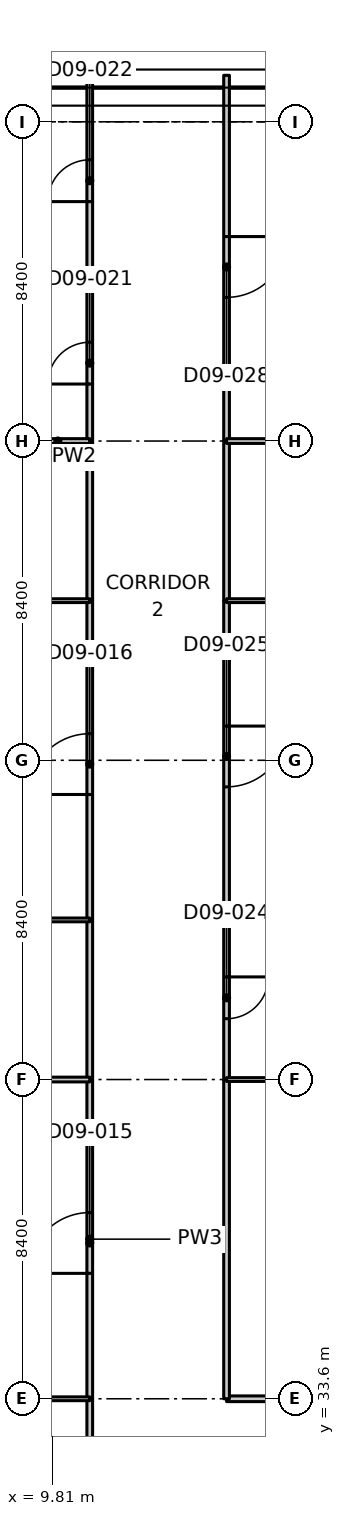
"""IFC4 building model, lengths in metres.
Left out: names, types, materials, properties, quantities, classifications, styles, units other than length and angle.
Written with IfcOpenShell. Run it as: python <this file> out.ifc"""

import sys

from ifc_helpers import new_model, si_unit, direction, frame, frame_2d, origin, place, context, subcontext, project, spatial, polyline, rectangle, outline, extrude, element, fill, save


model = new_model("IFC4")
c1 = context("Model", 3, precision=1e-05, world=origin(), true_north=direction((0.0, 1.0)))
c2 = subcontext(c1, "Body", "Model", "MODEL_VIEW")
j1 = project(units=[si_unit("LENGTHUNIT", "METRE"), si_unit("PLANEANGLEUNIT", "RADIAN")], contexts=[c1])
p1 = place(None, origin())
s1 = spatial("IfcSite", under=j1, at=p1, CompositionType="ELEMENT")
p2 = place(p1, origin())
s2 = spatial("IfcBuilding", under=s1, at=p2, CompositionType="ELEMENT")
p3 = place(p2, frame((0.0, 0.0, 65.3)))
s3 = spatial("IfcBuildingStorey", under=s2, at=p3, CompositionType="ELEMENT", Elevation=65.3)
p4 = place(p3, frame((10.8, 25.2, 0.0), z_axis=(0.0, 0.0, 1.0), x_axis=(0.0, 1.0, 0.0)))
e1 = element("IfcWall", 1, at=p4, inside=s3, PredefinedType="PARTITIONING", context=c2, shape_type="SweptSolid", body=[
    extrude(rectangle(XDim=8.4, YDim=0.15, at=frame_2d((4.2, 0.0))), origin(), (0.0, 0.0, 1.0), 3.33),
])
p5 = place(p4, frame((3.3, 0.0, 0.0)))
e2 = element("IfcOpeningElement", 2, at=p5, cuts=e1, PredefinedType="OPENING", context=c2, shape_type="SweptSolid", body=[
    extrude(rectangle(XDim=1.6, YDim=2.1, at=frame_2d((0.8, 1.05))), frame((0.0, 0.085, 0.0), z_axis=(0.0, -1.0, 0.0), x_axis=(1.0, 0.0, 0.0)), (0.0, 0.0, 1.0), 0.17),
])
p6 = place(p3, frame((14.4, 33.6, 0.0), z_axis=(0.0, 0.0, 1.0), x_axis=(1.0, 0.0, 0.0)))
e3 = element("IfcWall", 3, at=p6, inside=s3, PredefinedType="PARTITIONING", context=c2, shape_type="SweptSolid", body=[
    extrude(rectangle(XDim=1.5, YDim=0.15, at=frame_2d((0.75, 0.0))), origin(), (0.0, 0.0, 1.0), 3.33),
])
p7 = place(p3, frame((10.8, 33.6, 0.0), z_axis=(0.0, 0.0, 1.0), x_axis=(0.0, 1.0, 0.0)))
e4 = element("IfcWall", 4, at=p7, inside=s3, PredefinedType="PARTITIONING", context=c2, shape_type="SweptSolid", body=[
    extrude(rectangle(XDim=8.4, YDim=0.15, at=frame_2d((4.2, 0.0))), origin(), (0.0, 0.0, 1.0), 3.33),
])
p8 = place(p7, frame((3.3, 0.0, 0.0)))
e5 = element("IfcOpeningElement", 5, at=p8, cuts=e4, PredefinedType="OPENING", context=c2, shape_type="SweptSolid", body=[
    extrude(rectangle(XDim=1.6, YDim=2.1, at=frame_2d((0.8, 1.05))), frame((0.0, 0.085, 0.0), z_axis=(0.0, -1.0, 0.0), x_axis=(1.0, 0.0, 0.0)), (0.0, 0.0, 1.0), 0.17),
])
p9 = place(p3, frame((10.8, 46.2, 0.0), z_axis=(0.0, 0.0, 1.0), x_axis=(0.0, 1.0, 0.0)))
e6 = element("IfcWall", 6, at=p9, inside=s3, PredefinedType="PARTITIONING", context=c2, shape_type="SweptSolid", body=[
    extrude(rectangle(XDim=8.4, YDim=0.15, at=frame_2d((4.2, 0.0))), origin(), (0.0, 0.0, 1.0), 3.33),
])
p10 = place(p9, frame((3.3, 0.0, 0.0)))
e7 = element("IfcOpeningElement", 7, at=p10, cuts=e6, PredefinedType="OPENING", context=c2, shape_type="SweptSolid", body=[
    extrude(rectangle(XDim=1.6, YDim=2.1, at=frame_2d((0.8, 1.05))), frame((0.0, 0.085, 0.0), z_axis=(0.0, -1.0, 0.0), x_axis=(1.0, 0.0, 0.0)), (0.0, 0.0, 1.0), 0.17),
])
for number, where, z_axis, x_axis in (
    (8, (10.8, 54.6, 0.0), (0.0, 0.0, 1.0), (0.0, 1.0, 0.0)),
    (9, (10.8, 42.0, 0.0), (0.0, 0.0, 1.0), (0.0, 1.0, 0.0)),
):
    element("IfcWall", number, at=place(p3, frame(where, z_axis=z_axis, x_axis=x_axis)), inside=s3, PredefinedType="PARTITIONING", context=c2, shape_type="SweptSolid", body=[
        extrude(rectangle(XDim=4.2, YDim=0.15, at=frame_2d((2.1, 0.0))), origin(), (0.0, 0.0, 1.0), 3.33),
    ])
p11 = place(p3, frame((10.8, 58.8, 0.0), z_axis=(0.0, 0.0, 1.0), x_axis=(0.0, 1.0, 0.0)))
e10 = element("IfcWall", 10, at=p11, inside=s3, PredefinedType="PARTITIONING", context=c2, shape_type="SweptSolid", body=[
    extrude(rectangle(XDim=4.2, YDim=0.15, at=frame_2d((2.1, 0.0))), origin(), (0.0, 0.0, 1.0), 3.33),
])
p12 = place(p11, frame((1.5, 0.0, 0.0)))
e11 = element("IfcOpeningElement", 11, at=p12, cuts=e10, PredefinedType="OPENING", context=c2, shape_type="SweptSolid", body=[
    extrude(rectangle(XDim=1.1, YDim=2.1, at=frame_2d((0.55, 1.05))), frame((0.0, 0.085, 0.0), z_axis=(0.0, -1.0, 0.0), x_axis=(1.0, 0.0, 0.0)), (0.0, 0.0, 1.0), 0.17),
])
p13 = place(p3, frame((10.8, 63.0, 0.0), z_axis=(0.0, 0.0, 1.0), x_axis=(0.0, 1.0, 0.0)))
e12 = element("IfcWall", 12, at=p13, inside=s3, PredefinedType="PARTITIONING", context=c2, shape_type="SweptSolid", body=[
    extrude(outline(polyline([(0.0, 0.0), (5.423, 0.0), (5.423, 3.33), (5.28, 3.33), (4.65, 3.33), (4.648, 2.98), (3.752, 2.98), (3.75, 3.33), (0.0, 3.33), (0.0, 0.0)])), frame((0.0, 0.075, 0.0), z_axis=(0.0, -1.0, 0.0), x_axis=(1.0, 0.0, 0.0)), (0.0, 0.0, 1.0), 0.15),
])
p14 = place(p13, frame((2.1, 0.0, 0.0)))
e13 = element("IfcOpeningElement", 13, at=p14, cuts=e12, PredefinedType="OPENING", context=c2, shape_type="SweptSolid", body=[
    extrude(rectangle(XDim=1.1, YDim=2.1, at=frame_2d((0.55, 1.05))), frame((0.0, 0.085, 0.0), z_axis=(0.0, -1.0, 0.0), x_axis=(1.0, 0.0, 0.0)), (0.0, 0.0, 1.0), 0.17),
])
p15 = place(p3, frame((14.4, 42.0, 0.0), z_axis=(0.0, 0.0, 1.0), x_axis=(0.0, -1.0, 0.0)))
e14 = element("IfcWall", 14, at=p15, inside=s3, PredefinedType="PARTITIONING", context=c2, shape_type="SweptSolid", body=[
    extrude(rectangle(XDim=8.4, YDim=0.15, at=frame_2d((4.2, 0.0))), origin(), (0.0, 0.0, 1.0), 3.33),
])
p16 = place(p3, frame((14.4, 46.2, 0.0), z_axis=(0.0, 0.0, 1.0), x_axis=(0.0, -1.0, 0.0)))
e15 = element("IfcWall", 15, at=p16, inside=s3, PredefinedType="PARTITIONING", context=c2, shape_type="SweptSolid", body=[
    extrude(rectangle(XDim=4.2, YDim=0.15, at=frame_2d((2.1, 0.0))), origin(), (0.0, 0.0, 1.0), 3.33),
])
p17 = place(p16, frame((1.5, 0.0, 0.0)))
e16 = element("IfcOpeningElement", 16, at=p17, cuts=e15, PredefinedType="OPENING", context=c2, shape_type="SweptSolid", body=[
    extrude(rectangle(XDim=1.1, YDim=2.1, at=frame_2d((0.55, 1.05))), frame((0.0, 0.085, 0.0), z_axis=(0.0, -1.0, 0.0), x_axis=(1.0, 0.0, 0.0)), (0.0, 0.0, 1.0), 0.17),
])
p18 = place(p3, frame((14.4, 54.6, 0.0), z_axis=(0.0, 0.0, 1.0), x_axis=(0.0, -1.0, 0.0)))
e17 = element("IfcWall", 17, at=p18, inside=s3, PredefinedType="PARTITIONING", context=c2, shape_type="SweptSolid", body=[
    extrude(rectangle(XDim=8.4, YDim=0.15, at=frame_2d((4.2, 0.0))), origin(), (0.0, 0.0, 1.0), 3.33),
])
p19 = place(p18, frame((3.3, 0.0, 0.0)))
e18 = element("IfcOpeningElement", 18, at=p19, cuts=e17, PredefinedType="OPENING", context=c2, shape_type="SweptSolid", body=[
    extrude(rectangle(XDim=1.6, YDim=2.1, at=frame_2d((0.8, 1.05))), frame((0.0, 0.085, 0.0), z_axis=(0.0, -1.0, 0.0), x_axis=(1.0, 0.0, 0.0)), (0.0, 0.0, 1.0), 0.17),
])
p20 = place(p3, frame((14.4, 58.8, 0.0), z_axis=(0.0, 0.0, 1.0), x_axis=(0.0, -1.0, 0.0)))
e19 = element("IfcWall", 19, at=p20, inside=s3, PredefinedType="PARTITIONING", context=c2, shape_type="SweptSolid", body=[
    extrude(rectangle(XDim=4.2, YDim=0.15, at=frame_2d((2.1, 0.0))), origin(), (0.0, 0.0, 1.0), 3.33),
])
p21 = place(p3, frame((14.4, 68.423, 0.0), z_axis=(0.0, 0.0, 1.0), x_axis=(0.0, -1.0, 0.0)))
e20 = element("IfcWall", 20, at=p21, inside=s3, PredefinedType="PARTITIONING", context=c2, shape_type="SweptSolid", body=[
    extrude(outline(polyline([(0.0, 0.0), (9.623, 0.0), (9.623, 3.33), (1.673, 3.33), (1.671, 2.98), (0.775, 2.98), (0.773, 3.33), (0.143, 3.33), (0.0, 3.33), (0.0, 0.0)])), frame((0.0, 0.075, 0.0), z_axis=(0.0, -1.0, 0.0), x_axis=(1.0, 0.0, 0.0)), (0.0, 0.0, 1.0), 0.15),
])
p22 = place(p21, frame((4.243, 0.0, 0.0)))
e21 = element("IfcOpeningElement", 21, at=p22, cuts=e20, PredefinedType="OPENING", context=c2, shape_type="SweptSolid", body=[
    extrude(rectangle(XDim=1.6, YDim=2.1, at=frame_2d((0.8, 1.05))), frame((0.0, 0.085, 0.0), z_axis=(0.0, -1.0, 0.0), x_axis=(1.0, 0.0, 0.0)), (0.0, 0.0, 1.0), 0.17),
])
p23 = place(p3, frame((9.12, 33.6, 0.0), z_axis=(0.0, 0.0, 1.0), x_axis=(1.0, 0.0, 0.0)))
e22 = element("IfcWall", 22, at=p23, inside=s3, PredefinedType="PARTITIONING", context=c2, shape_type="SweptSolid", body=[
    extrude(rectangle(XDim=1.68, YDim=0.1, at=frame_2d((0.84, 0.0))), origin(), (0.0, 0.0, 1.0), 3.33),
])
p24 = place(p3, frame((9.12, 42.0, 0.0), z_axis=(0.0, 0.0, 1.0), x_axis=(1.0, 0.0, 0.0)))
e23 = element("IfcWall", 23, at=p24, inside=s3, PredefinedType="PARTITIONING", context=c2, shape_type="SweptSolid", body=[
    extrude(rectangle(XDim=1.68, YDim=0.125, at=frame_2d((0.84, 0.0))), origin(), (0.0, 0.0, 1.0), 3.33),
])
p25 = place(p3, frame((4.2, 54.6, 0.0), z_axis=(0.0, 0.0, 1.0), x_axis=(1.0, 0.0, 0.0)))
e24 = element("IfcWall", 24, at=p25, inside=s3, PredefinedType="PARTITIONING", context=c2, shape_type="SweptSolid", body=[
    extrude(rectangle(XDim=6.6, YDim=0.1, at=frame_2d((3.3, 0.0))), origin(), (0.0, 0.0, 1.0), 3.33),
])
p26 = place(p25, frame((2.7, 0.0, 0.0)))
e25 = element("IfcOpeningElement", 25, at=p26, cuts=e24, PredefinedType="OPENING", context=c2, shape_type="SweptSolid", body=[
    extrude(rectangle(XDim=1.0, YDim=2.1, at=frame_2d((0.5, 1.05))), frame((0.0, 0.06, 0.0), z_axis=(0.0, -1.0, 0.0), x_axis=(1.0, 0.0, 0.0)), (0.0, 0.0, 1.0), 0.12),
])
p27 = place(p3, frame((10.8, 46.2, 0.0), z_axis=(0.0, 0.0, 1.0), x_axis=(-1.0, 0.0, 0.0)))
e26 = element("IfcWall", 26, at=p27, inside=s3, PredefinedType="PARTITIONING", context=c2, shape_type="SweptSolid", body=[
    extrude(rectangle(XDim=7.2, YDim=0.1, at=frame_2d((3.6, 0.0))), origin(), (0.0, 0.0, 1.0), 3.33),
])
p28 = place(p27, frame((3.0, 0.0, 0.0)))
e27 = element("IfcOpeningElement", 27, at=p28, cuts=e26, PredefinedType="OPENING", context=c2, shape_type="SweptSolid", body=[
    extrude(rectangle(XDim=1.0, YDim=2.1, at=frame_2d((0.5, 1.05))), frame((0.0, 0.06, 0.0), z_axis=(0.0, -1.0, 0.0), x_axis=(1.0, 0.0, 0.0)), (0.0, 0.0, 1.0), 0.12),
])
p29 = place(p3, frame((9.12, 58.8, 0.0), z_axis=(0.0, 0.0, 1.0), x_axis=(1.0, 0.0, 0.0)))
e28 = element("IfcWall", 28, at=p29, inside=s3, PredefinedType="PARTITIONING", context=c2, shape_type="SweptSolid", body=[
    extrude(rectangle(XDim=1.68, YDim=0.125, at=frame_2d((0.84, 0.0))), origin(), (0.0, 0.0, 1.0), 3.33),
])
p30 = place(p3, frame((-0.2, 63.0, 0.0), z_axis=(0.0, 0.0, 1.0), x_axis=(1.0, 0.0, 0.0)))
e29 = element("IfcWall", 29, at=p30, inside=s3, PredefinedType="PARTITIONING", context=c2, shape_type="SweptSolid", body=[
    extrude(outline(polyline([(0.0, 0.0), (11.0, 0.0), (11.0, 3.33), (5.066, 3.33), (5.064, 2.98), (3.736, 2.98), (3.734, 3.33), (0.0, 3.33), (0.0, 0.0)])), frame((0.0, 0.05, 0.0), z_axis=(0.0, -1.0, 0.0), x_axis=(1.0, 0.0, 0.0)), (0.0, 0.0, 1.0), 0.1),
])
p31 = place(p3, frame((14.4, 42.0, 0.0), z_axis=(0.0, 0.0, 1.0), x_axis=(1.0, 0.0, 0.0)))
e30 = element("IfcWall", 30, at=p31, inside=s3, PredefinedType="PARTITIONING", context=c2, shape_type="SweptSolid", body=[
    extrude(rectangle(XDim=1.68, YDim=0.1, at=frame_2d((0.84, 0.0))), origin(), (0.0, 0.0, 1.0), 3.33),
])
p32 = place(p3, frame((14.4, 46.2, 0.0), z_axis=(0.0, 0.0, 1.0), x_axis=(1.0, 0.0, 0.0)))
e31 = element("IfcWall", 31, at=p32, inside=s3, PredefinedType="PARTITIONING", context=c2, shape_type="SweptSolid", body=[
    extrude(outline(polyline([(0.0, 0.0), (11.974, 0.0), (11.974, 3.33), (11.9, 3.33), (11.25, 3.33), (11.248, 2.98), (10.352, 2.98), (10.35, 3.33), (0.0, 3.33), (0.0, 0.0)])), frame((0.0, 0.062, 0.0), z_axis=(0.0, -1.0, 0.0), x_axis=(1.0, 0.0, 0.0)), (0.0, 0.0, 1.0), 0.125),
])
p33 = place(p3, frame((14.4, 54.6, 0.0), z_axis=(0.0, 0.0, 1.0), x_axis=(1.0, 0.0, 0.0)))
e32 = element("IfcWall", 32, at=p33, inside=s3, PredefinedType="PARTITIONING", context=c2, shape_type="SweptSolid", body=[
    extrude(rectangle(XDim=7.8, YDim=0.1, at=frame_2d((3.9, 0.0))), origin(), (0.0, 0.0, 1.0), 3.33),
])
p34 = place(p33, frame((3.3, 0.0, 0.0)))
e33 = element("IfcOpeningElement", 33, at=p34, cuts=e32, PredefinedType="OPENING", context=c2, shape_type="SweptSolid", body=[
    extrude(rectangle(XDim=1.0, YDim=2.1, at=frame_2d((0.5, 1.05))), frame((0.0, 0.06, 0.0), z_axis=(0.0, -1.0, 0.0), x_axis=(1.0, 0.0, 0.0)), (0.0, 0.0, 1.0), 0.12),
])
p35 = place(p3, frame((14.4, 58.8, 0.0), z_axis=(0.0, 0.0, 1.0), x_axis=(1.0, 0.0, 0.0)))
e34 = element("IfcWall", 34, at=p35, inside=s3, PredefinedType="PARTITIONING", context=c2, shape_type="SweptSolid", body=[
    extrude(rectangle(XDim=1.68, YDim=0.125, at=frame_2d((0.84, 0.0))), origin(), (0.0, 0.0, 1.0), 3.33),
])
p36 = place(p8, origin())
e35 = element("IfcDoor", 35, at=p36, inside=s3, OperationType="DOUBLE_DOOR_SINGLE_SWING", PredefinedType="DOOR", context=c2, shape_type="SweptSolid", body=[
    extrude(rectangle(XDim=1.6, YDim=2.1, at=frame_2d((0.8, 1.05))), frame((0.0, 0.025, 0.0), z_axis=(0.0, -1.0, 0.0), x_axis=(1.0, 0.0, 0.0)), (0.0, 0.0, 1.0), 0.05),
])
fill(e5, e35)
p37 = place(p10, origin())
e36 = element("IfcDoor", 36, at=p37, inside=s3, OperationType="DOUBLE_DOOR_SINGLE_SWING", PredefinedType="DOOR", context=c2, shape_type="SweptSolid", body=[
    extrude(rectangle(XDim=1.6, YDim=2.1, at=frame_2d((0.8, 1.05))), frame((0.0, 0.025, 0.0), z_axis=(0.0, -1.0, 0.0), x_axis=(1.0, 0.0, 0.0)), (0.0, 0.0, 1.0), 0.05),
])
fill(e7, e36)
p38 = place(p12, origin())
e37 = element("IfcDoor", 37, at=p38, inside=s3, OperationType="SINGLE_SWING_LEFT", PredefinedType="DOOR", context=c2, shape_type="SweptSolid", body=[
    extrude(rectangle(XDim=1.1, YDim=2.1, at=frame_2d((0.55, 1.05))), frame((0.0, 0.025, 0.0), z_axis=(0.0, -1.0, 0.0), x_axis=(1.0, 0.0, 0.0)), (0.0, 0.0, 1.0), 0.05),
])
fill(e11, e37)
p39 = place(p14, origin())
e38 = element("IfcDoor", 38, at=p39, inside=s3, OperationType="SINGLE_SWING_LEFT", PredefinedType="DOOR", context=c2, shape_type="SweptSolid", body=[
    extrude(rectangle(XDim=1.1, YDim=2.1, at=frame_2d((0.55, 1.05))), frame((0.0, 0.025, 0.0), z_axis=(0.0, -1.0, 0.0), x_axis=(1.0, 0.0, 0.0)), (0.0, 0.0, 1.0), 0.05),
])
fill(e13, e38)
p40 = place(p17, origin())
e39 = element("IfcDoor", 39, at=p40, inside=s3, OperationType="SINGLE_SWING_LEFT", PredefinedType="DOOR", context=c2, shape_type="SweptSolid", body=[
    extrude(rectangle(XDim=1.1, YDim=2.1, at=frame_2d((0.55, 1.05))), frame((0.0, 0.025, 0.0), z_axis=(0.0, -1.0, 0.0), x_axis=(1.0, 0.0, 0.0)), (0.0, 0.0, 1.0), 0.05),
])
fill(e16, e39)
p41 = place(p19, origin())
e40 = element("IfcDoor", 40, at=p41, inside=s3, OperationType="DOUBLE_DOOR_SINGLE_SWING", PredefinedType="DOOR", context=c2, shape_type="SweptSolid", body=[
    extrude(rectangle(XDim=1.6, YDim=2.1, at=frame_2d((0.8, 1.05))), frame((0.0, 0.025, 0.0), z_axis=(0.0, -1.0, 0.0), x_axis=(1.0, 0.0, 0.0)), (0.0, 0.0, 1.0), 0.05),
])
fill(e18, e40)
p42 = place(p22, origin())
e41 = element("IfcDoor", 41, at=p42, inside=s3, OperationType="DOUBLE_DOOR_SINGLE_SWING", PredefinedType="DOOR", context=c2, shape_type="SweptSolid", body=[
    extrude(rectangle(XDim=1.6, YDim=2.1, at=frame_2d((0.8, 1.05))), frame((0.0, 0.025, 0.0), z_axis=(0.0, -1.0, 0.0), x_axis=(1.0, 0.0, 0.0)), (0.0, 0.0, 1.0), 0.05),
])
fill(e21, e41)
save(model, sys.argv[1])
